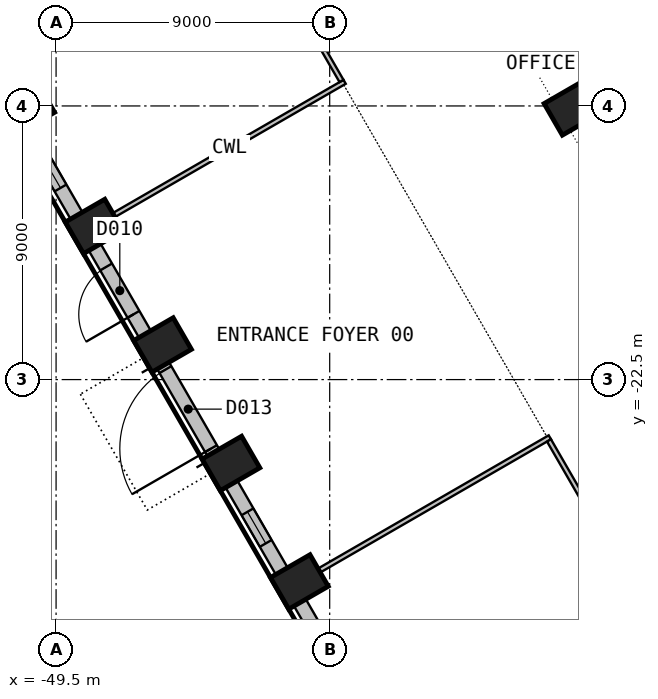
"""IFC4 building model, lengths in metres.
Left out: names, types, materials, properties, quantities, classifications, styles, units other than length and angle.
Written with IfcOpenShell. Run it as: python <this file> out.ifc"""

import sys

from ifc_helpers import new_model, si_unit, direction, frame, frame_2d, origin, origin_2d, place, context, subcontext, project, spatial, rectangle, extrude, element, fill, save


model = new_model("IFC4")
c1 = context("Model", 3, precision=1e-05, world=origin(), true_north=direction((0.0, 1.0)))
c2 = subcontext(c1, "Body", "Model", "MODEL_VIEW")
j1 = project(units=[si_unit("LENGTHUNIT", "METRE"), si_unit("PLANEANGLEUNIT", "RADIAN")], contexts=[c1])
p1 = place(None, origin())
s1 = spatial("IfcSite", under=j1, at=p1, CompositionType="ELEMENT")
p2 = place(p1, origin())
s2 = spatial("IfcBuilding", under=s1, at=p2, CompositionType="ELEMENT")
p3 = place(p2, origin())
s3 = spatial("IfcBuildingStorey", under=s2, at=p3, CompositionType="ELEMENT", Elevation=0.0)
for number, where, z_axis, x_axis in (
    (1, (-50.498, -13.566, 0.0), (0.0, 0.0, 1.0), (0.5, -0.866, 0.0)),
    (2, (-48.248, -17.463, 0.0), (0.0, 0.0, 1.0), (0.5, -0.866, 0.0)),
    (3, (-45.998, -21.361, 0.0), (0.0, 0.0, 1.0), (0.5, -0.866, 0.0)),
    (4, (-43.748, -25.258, 0.0), (0.0, 0.0, 1.0), (0.5, -0.866, 0.0)),
    (5, (-41.498, -29.155, 0.0), (0.0, 0.0, 1.0), (0.5, -0.866, 0.0)),
):
    element("IfcColumn", number, at=place(p3, frame(where, z_axis=z_axis, x_axis=x_axis)), inside=s3, PredefinedType="COLUMN", context=c2, shape_type="SweptSolid", body=[
        extrude(rectangle(XDim=1.2, YDim=1.5, at=origin_2d()), origin(), (0.0, 0.0, 1.0), 6.0),
    ])
p4 = place(p3, frame((-32.498, -13.566, 0.0), z_axis=(0.0, 0.0, 1.0), x_axis=(0.5, -0.866025403784, 0.0)))
e6 = element("IfcColumn", 6, at=p4, inside=s3, PredefinedType="COLUMN", context=c2, shape_type="SweptSolid", body=[
    extrude(rectangle(XDim=1.2, YDim=1.5, at=origin_2d()), origin(), (0.0, 0.0, 1.0), 5.6),
])
p5 = place(p3, frame((-50.479, -14.249, 0.0), z_axis=(0.0, 0.0, 1.0), x_axis=(0.49995947208, -0.866048801325, 0.0)))
e7 = element("IfcWall", 7, at=p5, inside=s3, PredefinedType="SOLIDWALL", context=c2, shape_type="SweptSolid", body=[
    extrude(rectangle(XDim=3.299, YDim=0.45, at=frame_2d((1.649, 0.0))), origin(), (0.0, 0.0, 1.0), 6.0),
])
p6 = place(p5, frame((1.05, 0.0, 0.9)))
e8 = element("IfcOpeningElement", 8, at=p6, cuts=e7, PredefinedType="OPENING", context=c2, shape_type="SweptSolid", body=[
    extrude(rectangle(XDim=1.2, YDim=4.2, at=frame_2d((0.6, 2.1))), frame((0.0, 0.235, 0.0), z_axis=(0.0, -1.0, 0.0), x_axis=(1.0, 0.0, 0.0)), (0.0, 0.0, 1.0), 0.47),
])
p7 = place(p3, frame((-46.579, -21.003, 0.0), z_axis=(0.0, 0.0, 1.0), x_axis=(-0.499991515992, 0.866030301974, 0.0)))
e9 = element("IfcWall", 9, at=p7, inside=s3, PredefinedType="SOLIDWALL", context=c2, shape_type="SweptSolid", body=[
    extrude(rectangle(XDim=3.299, YDim=0.45, at=frame_2d((1.649, 0.0))), origin(), (0.0, 0.0, 1.0), 6.0),
])
p8 = place(p7, frame((0.75, 0.0, 0.0)))
e10 = element("IfcOpeningElement", 10, at=p8, cuts=e9, PredefinedType="OPENING", context=c2, shape_type="SweptSolid", body=[
    extrude(rectangle(XDim=1.8, YDim=2.4, at=frame_2d((0.9, 1.2))), frame((0.0, 0.235, 0.0), z_axis=(0.0, -1.0, 0.0), x_axis=(1.0, 0.0, 0.0)), (0.0, 0.0, 1.0), 0.47),
])
p9 = place(p3, frame((-44.329, -24.9, 0.0), z_axis=(0.0, 0.0, 1.0), x_axis=(-0.499991515992, 0.866030301974, 0.0)))
e11 = element("IfcWall", 11, at=p9, inside=s3, PredefinedType="SOLIDWALL", context=c2, shape_type="SweptSolid", body=[
    extrude(rectangle(XDim=3.299, YDim=0.45, at=frame_2d((1.649, 0.0))), origin(), (0.0, 0.0, 1.0), 6.0),
])
p10 = place(p9, frame((0.149, 0.0, 0.0)))
e12 = element("IfcOpeningElement", 12, at=p10, cuts=e11, PredefinedType="OPENING", context=c2, shape_type="SweptSolid", body=[
    extrude(rectangle(XDim=3.0, YDim=4.2, at=frame_2d((1.5, 2.1))), frame((0.0, 0.235, 0.0), z_axis=(0.0, -1.0, 0.0), x_axis=(1.0, 0.0, 0.0)), (0.0, 0.0, 1.0), 0.47),
])
p11 = place(p3, frame((-43.729, -25.94, 0.0), z_axis=(0.0, 0.0, 1.0), x_axis=(0.49995947208, -0.866048801325, 0.0)))
e13 = element("IfcWall", 13, at=p11, inside=s3, PredefinedType="SOLIDWALL", context=c2, shape_type="SweptSolid", body=[
    extrude(rectangle(XDim=3.299, YDim=0.45, at=frame_2d((1.649, 0.0))), origin(), (0.0, 0.0, 1.0), 6.0),
])
p12 = place(p11, frame((1.05, 0.0, 0.9)))
e14 = element("IfcOpeningElement", 14, at=p12, cuts=e13, PredefinedType="OPENING", context=c2, shape_type="SweptSolid", body=[
    extrude(rectangle(XDim=1.2, YDim=4.2, at=frame_2d((0.6, 2.1))), frame((0.0, 0.235, 0.0), z_axis=(0.0, -1.0, 0.0), x_axis=(1.0, 0.0, 0.0)), (0.0, 0.0, 1.0), 0.47),
])
p13 = place(p3, frame((-41.479, -29.837, 0.0), z_axis=(0.0, 0.0, 1.0), x_axis=(0.499991515992, -0.866030301974, 0.0)))
e15 = element("IfcWall", 15, at=p13, inside=s3, PredefinedType="SOLIDWALL", context=c2, shape_type="SweptSolid", body=[
    extrude(rectangle(XDim=3.299, YDim=0.45, at=frame_2d((1.649, 0.0))), origin(), (0.0, 0.0, 1.0), 6.0),
])
p14 = place(p13, frame((1.05, 0.0, 0.9)))
e16 = element("IfcOpeningElement", 16, at=p14, cuts=e15, PredefinedType="OPENING", context=c2, shape_type="SweptSolid", body=[
    extrude(rectangle(XDim=1.2, YDim=4.2, at=frame_2d((0.6, 2.1))), frame((0.0, 0.235, 0.0), z_axis=(0.0, -1.0, 0.0), x_axis=(1.0, 0.0, 0.0)), (0.0, 0.0, 1.0), 0.47),
])
p15 = place(p3, frame((-47.581, -17.078, 0.0), z_axis=(0.0, 0.0, 1.0), x_axis=(0.866024693403, 0.500001230415, 0.0)))
e17 = element("IfcWall", 17, at=p15, inside=s3, PredefinedType="PARTITIONING", context=c2, shape_type="SweptSolid", body=[
    extrude(rectangle(XDim=8.743, YDim=0.15, at=frame_2d((4.372, 0.0))), origin(), (0.0, 0.0, 1.0), 6.0),
])
p16 = place(p3, frame((-40.112, -12.679, 0.0), z_axis=(0.0, 0.0, 1.0), x_axis=(-0.499979704663, 0.866037120986, 0.0)))
e18 = element("IfcWall", 18, at=p16, inside=s3, PredefinedType="PARTITIONING", context=c2, shape_type="SweptSolid", body=[
    extrude(rectangle(XDim=10.296, YDim=0.15, at=frame_2d((5.148, 0.0))), origin(), (0.0, 0.0, 1.0), 6.0),
])
p17 = place(p16, frame((4.648, 0.0, 0.0)))
e19 = element("IfcOpeningElement", 19, at=p17, cuts=e18, PredefinedType="OPENING", context=c2, shape_type="SweptSolid", body=[
    extrude(rectangle(XDim=1.0, YDim=2.1, at=frame_2d((0.5, 1.05))), frame((0.0, 0.085, 0.0), z_axis=(0.0, -1.0, 0.0), x_axis=(1.0, 0.0, 0.0)), (0.0, 0.0, 1.0), 0.17),
])
p18 = place(p3, frame((-33.259, -24.398, 0.0), z_axis=(0.0, 0.0, 1.0), x_axis=(-0.866017712198, -0.500013321982, 0.0)))
e20 = element("IfcWall", 20, at=p18, inside=s3, PredefinedType="PARTITIONING", context=c2, shape_type="SweptSolid", body=[
    extrude(rectangle(XDim=8.743, YDim=0.15, at=frame_2d((4.372, 0.0))), origin(), (0.0, 0.0, 1.0), 6.0),
])
p19 = place(p3, frame((-28.062, -33.548, 0.0), z_axis=(0.0, 0.0, 1.0), x_axis=(-0.500064997195, 0.865987874384, 0.0)))
e21 = element("IfcWall", 21, at=p19, inside=s3, PredefinedType="PARTITIONING", context=c2, shape_type="SweptSolid", body=[
    extrude(rectangle(XDim=10.447, YDim=0.15, at=frame_2d((5.223, 0.0))), origin(), (0.0, 0.0, 1.0), 6.0),
])
p20 = place(p19, frame((4.723, 0.0, 0.0)))
e22 = element("IfcOpeningElement", 22, at=p20, cuts=e21, PredefinedType="OPENING", context=c2, shape_type="SweptSolid", body=[
    extrude(rectangle(XDim=1.0, YDim=2.1, at=frame_2d((0.5, 1.05))), frame((0.0, 0.085, 0.0), z_axis=(0.0, -1.0, 0.0), x_axis=(1.0, 0.0, 0.0)), (0.0, 0.0, 1.0), 0.17),
])
p21 = place(p6, origin())
e23 = element("IfcWindow", 23, at=p21, inside=s3, PartitioningType="SINGLE_PANEL", PredefinedType="WINDOW", context=c2, shape_type="SweptSolid", body=[
    extrude(rectangle(XDim=1.2, YDim=4.2, at=frame_2d((0.6, 2.1))), frame((0.0, 0.03, 0.0), z_axis=(0.0, -1.0, 0.0), x_axis=(1.0, 0.0, 0.0)), (0.0, 0.0, 1.0), 0.06),
])
fill(e8, e23)
p22 = place(p8, origin())
e24 = element("IfcDoor", 24, at=p22, inside=s3, OperationType="DOUBLE_DOOR_SINGLE_SWING", PredefinedType="DOOR", context=c2, shape_type="SweptSolid", body=[
    extrude(rectangle(XDim=1.8, YDim=2.4, at=frame_2d((0.9, 1.2))), frame((0.0, 0.025, 0.0), z_axis=(0.0, -1.0, 0.0), x_axis=(1.0, 0.0, 0.0)), (0.0, 0.0, 1.0), 0.05),
])
fill(e10, e24)
p23 = place(p10, origin())
e25 = element("IfcDoor", 25, at=p23, inside=s3, OperationType="DOUBLE_DOOR_SINGLE_SWING", PredefinedType="DOOR", context=c2, shape_type="SweptSolid", body=[
    extrude(rectangle(XDim=3.0, YDim=4.2, at=frame_2d((1.5, 2.1))), frame((0.0, 0.025, 0.0), z_axis=(0.0, -1.0, 0.0), x_axis=(1.0, 0.0, 0.0)), (0.0, 0.0, 1.0), 0.05),
])
fill(e12, e25)
p24 = place(p12, origin())
e26 = element("IfcWindow", 26, at=p24, inside=s3, PartitioningType="SINGLE_PANEL", PredefinedType="WINDOW", context=c2, shape_type="SweptSolid", body=[
    extrude(rectangle(XDim=1.2, YDim=4.2, at=frame_2d((0.6, 2.1))), frame((0.0, 0.03, 0.0), z_axis=(0.0, -1.0, 0.0), x_axis=(1.0, 0.0, 0.0)), (0.0, 0.0, 1.0), 0.06),
])
fill(e14, e26)
save(model, sys.argv[1])
